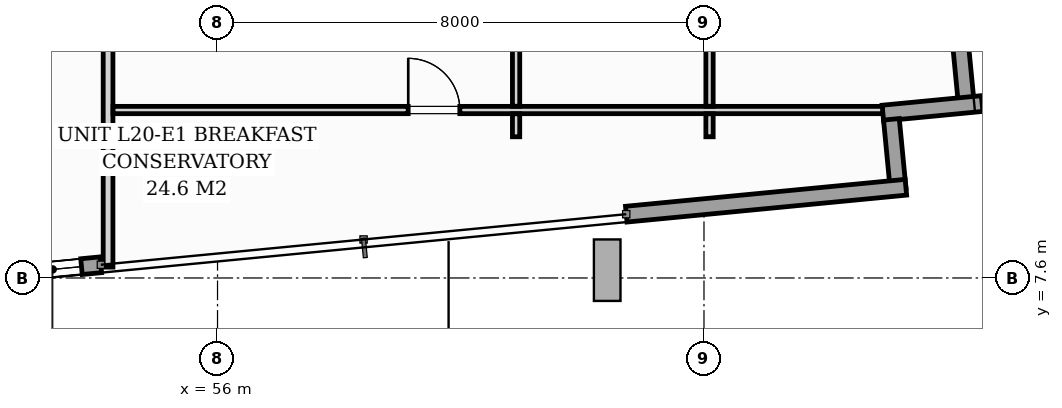
"""IFC4 building model, lengths in metres.
Left out: names, types, materials, properties, quantities, classifications, styles, units other than length and angle.
Written with IfcOpenShell. Run it as: python <this file> out.ifc"""

import sys

from ifc_helpers import new_model, si_unit, direction, frame, frame_2d, origin, origin_2d, place, context, subcontext, project, spatial, rectangle, i_section, extrude, source, transform, mapped, element, fill, save


model = new_model("IFC4")
c1 = context("Model", 3, precision=1e-05, world=origin(), true_north=direction((0.0, 1.0)))
c2 = subcontext(c1, "Body", "Model", "MODEL_VIEW")
j1 = project(units=[si_unit("LENGTHUNIT", "METRE"), si_unit("PLANEANGLEUNIT", "RADIAN")], contexts=[c1])
p1 = place(None, origin())
s1 = spatial("IfcSite", under=j1, at=p1, CompositionType="ELEMENT")
p2 = place(p1, origin())
s2 = spatial("IfcBuilding", under=s1, at=p2, CompositionType="ELEMENT")
p3 = place(p2, frame((0.0, 0.0, 72.6)))
s3 = spatial("IfcBuildingStorey", under=s2, at=p3, CompositionType="ELEMENT", Elevation=72.6)
m1 = source(origin(), c2, "Body", "SweptSolid", [
    extrude(i_section(OverallWidth=0.438, OverallDepth=1.011, WebThickness=0.041, FlangeThickness=0.074, FilletRadius=0.024, at=origin_2d()), origin(), (0.0, 0.0, 1.0), 6.388),
])
p4 = place(p3, frame((48.945, 6.415, 0.169), z_axis=(0.624362881187, 0.356074491279, 0.695256750601), x_axis=(-0.60394515579, -0.344430251362, 0.718761469991)))
e1 = element("IfcColumn", 1, at=p4, inside=s3, PredefinedType="COLUMN", context=c2, shape_type="MappedRepresentation", body=[
    mapped(m1, transform((0.0, 0.0, 0.0), scale=1.0)),
])
m2 = source(origin(), c2, "Body", "SweptSolid", [
    extrude(i_section(OverallWidth=0.438, OverallDepth=1.011, WebThickness=0.041, FlangeThickness=0.074, FilletRadius=0.024, at=origin_2d()), origin(), (0.0, 0.0, 1.0), 6.973),
])
p5 = place(p3, frame((61.351, 7.073, 0.181), z_axis=(0.65764639219, 0.407667940303, 0.633488810705), x_axis=(-0.538430545128, -0.333767316198, 0.773751850861)))
e2 = element("IfcColumn", 2, at=p5, inside=s3, PredefinedType="COLUMN", context=c2, shape_type="MappedRepresentation", body=[
    mapped(m2, transform((0.0, 0.0, 0.0), scale=1.0)),
])
p6 = place(p3, frame((68.183, 11.817, 0.0), z_axis=(0.0, 0.0, 1.0), x_axis=(0.095915846097, -0.995389446633, 0.0)))
e3 = element("IfcWall", 3, at=p6, inside=s3, PredefinedType="STANDARD", context=c2, shape_type="SweptSolid", body=[
    extrude(rectangle(XDim=1.395, YDim=0.26, at=frame_2d((0.697, 0.0))), origin(), (0.0, 0.0, 1.0), 4.78),
])
p7 = place(p3, frame((68.574, 10.469, 0.0), z_axis=(0.0, 0.0, 1.0), x_axis=(-0.995394563142, -0.095862733462, 0.0)))
e4 = element("IfcWall", 4, at=p7, inside=s3, PredefinedType="STANDARD", context=c2, shape_type="SweptSolid", body=[
    extrude(rectangle(XDim=1.64, YDim=0.26, at=frame_2d((0.82, 0.0))), origin(), (0.0, 0.0, 1.0), 4.78),
])
p8 = place(p3, frame((67.082, 10.209, 0.0), z_axis=(0.0, 0.0, 1.0), x_axis=(0.09576095695, -0.995404359607, 0.0)))
e5 = element("IfcWall", 5, at=p8, inside=s3, PredefinedType="STANDARD", context=c2, shape_type="SweptSolid", body=[
    extrude(rectangle(XDim=1.15, YDim=0.26, at=frame_2d((0.575, 0.0))), origin(), (0.0, 0.0, 1.0), 4.78),
])
p9 = place(p3, frame((67.32, 9.092, 0.0), z_axis=(0.0, 0.0, 1.0), x_axis=(-0.99539468832, -0.09586143367, 0.0)))
e6 = element("IfcWall", 6, at=p9, inside=s3, PredefinedType="STANDARD", context=c2, shape_type="SweptSolid", body=[
    extrude(rectangle(XDim=4.62, YDim=0.26, at=frame_2d((2.31, 0.0))), origin(), (0.0, 0.0, 1.0), 4.78),
])
p10 = place(p3, frame((54.082, 7.817, 0.0), z_axis=(0.0, 0.0, 1.0), x_axis=(-0.995397041205, -0.095836998914, 0.0)))
e7 = element("IfcWall", 7, at=p10, inside=s3, PredefinedType="STANDARD", context=c2, shape_type="SweptSolid", body=[
    extrude(rectangle(XDim=6.31, YDim=0.26, at=frame_2d((3.155, 0.0))), origin(), (0.0, 0.0, 1.0), 4.78),
])
p11 = place(p10, frame((0.32, 0.0, 0.75)))
e8 = element("IfcOpeningElement", 8, at=p11, cuts=e7, PredefinedType="OPENING", context=c2, shape_type="SweptSolid", body=[
    extrude(rectangle(XDim=0.95, YDim=1.5, at=frame_2d((0.475, 0.75))), frame((0.0, 0.14, 0.0), z_axis=(0.0, -1.0, 0.0), x_axis=(1.0, 0.0, 0.0)), (0.0, 0.0, 1.0), 0.28),
])
p12 = place(p3, frame((54.2, 7.778, 0.0), z_axis=(0.0, 0.0, 1.0), x_axis=(0.0, 1.0, 0.0)))
e9 = element("IfcWall", 9, at=p12, inside=s3, PredefinedType="PARTITIONING", context=c2, shape_type="SweptSolid", body=[
    extrude(rectangle(XDim=4.49, YDim=0.16, at=frame_2d((2.245, 0.0))), origin(), (0.0, 0.0, 1.0), 4.78),
])
p13 = place(p3, frame((54.282, 10.362, 0.0), z_axis=(0.0, 0.0, 1.0), x_axis=(1.0, 0.0, 0.0)))
e10 = element("IfcWall", 10, at=p13, inside=s3, PredefinedType="PARTITIONING", context=c2, shape_type="SweptSolid", body=[
    extrude(rectangle(XDim=12.655, YDim=0.12, at=frame_2d((6.327, 0.0))), origin(), (0.0, 0.0, 1.0), 4.78),
])
p14 = place(p13, frame((4.853, 0.0, 0.0)))
e11 = element("IfcOpeningElement", 11, at=p14, cuts=e10, PredefinedType="OPENING", context=c2, shape_type="SweptSolid", body=[
    extrude(rectangle(XDim=0.85, YDim=2.05, at=frame_2d((0.425, 1.025))), frame((0.0, 0.07, 0.0), z_axis=(0.0, -1.0, 0.0), x_axis=(1.0, 0.0, 0.0)), (0.0, 0.0, 1.0), 0.14),
])
p15 = place(p3, frame((64.091, 9.922, 0.0), z_axis=(0.0, 0.0, 1.0), x_axis=(0.0, 1.0, 0.0)))
e12 = element("IfcWall", 12, at=p15, inside=s3, PredefinedType="PARTITIONING", context=c2, shape_type="SweptSolid", body=[
    extrude(rectangle(XDim=0.378, YDim=0.12, at=frame_2d((0.189, 0.0))), origin(), (0.0, 0.0, 1.0), 4.78),
])
p16 = place(p3, frame((64.091, 10.424, 0.0), z_axis=(0.0, 0.0, 1.0), x_axis=(0.0, 1.0, 0.0)))
e13 = element("IfcWall", 13, at=p16, inside=s3, PredefinedType="PARTITIONING", context=c2, shape_type="SweptSolid", body=[
    extrude(rectangle(XDim=9.332, YDim=0.12, at=frame_2d((4.666, 0.0))), origin(), (0.0, 0.0, 1.0), 4.78),
])
p17 = place(p16, frame((4.241, 0.0, 0.0)))
e14 = element("IfcOpeningElement", 14, at=p17, cuts=e13, PredefinedType="OPENING", context=c2, shape_type="SweptSolid", body=[
    extrude(rectangle(XDim=0.85, YDim=2.05, at=frame_2d((0.425, 1.025))), frame((0.0, 0.07, 0.0), z_axis=(0.0, -1.0, 0.0), x_axis=(1.0, 0.0, 0.0)), (0.0, 0.0, 1.0), 0.14),
])
p18 = place(p3, frame((60.91, 9.922, 0.0), z_axis=(0.0, 0.0, 1.0), x_axis=(0.0, 1.0, 0.0)))
e15 = element("IfcWall", 15, at=p18, inside=s3, PredefinedType="PARTITIONING", context=c2, shape_type="SweptSolid", body=[
    extrude(rectangle(XDim=0.378, YDim=0.12, at=frame_2d((0.189, 0.0))), origin(), (0.0, 0.0, 1.0), 4.78),
])
p19 = place(p3, frame((60.91, 10.424, 0.0), z_axis=(0.0, 0.0, 1.0), x_axis=(0.0, 1.0, 0.0)))
e16 = element("IfcWall", 16, at=p19, inside=s3, PredefinedType="PARTITIONING", context=c2, shape_type="SweptSolid", body=[
    extrude(rectangle(XDim=9.332, YDim=0.12, at=frame_2d((4.666, 0.0))), origin(), (0.0, 0.0, 1.0), 4.78),
])
p20 = place(p19, frame((3.3, 0.0, 0.0)))
e17 = element("IfcOpeningElement", 17, at=p20, cuts=e16, PredefinedType="OPENING", context=c2, shape_type="SweptSolid", body=[
    extrude(rectangle(XDim=0.85, YDim=2.05, at=frame_2d((0.425, 1.025))), frame((0.0, 0.07, 0.0), z_axis=(0.0, -1.0, 0.0), x_axis=(1.0, 0.0, 0.0)), (0.0, 0.0, 1.0), 0.14),
])
m3 = source(origin(), c2, "Body", "SweptSolid", [
    extrude(rectangle(XDim=0.95, YDim=1.5, at=frame_2d((0.475, 0.75))), frame((0.0, 0.03, 0.0), z_axis=(0.0, -1.0, 0.0), x_axis=(1.0, 0.0, 0.0)), (0.0, 0.0, 1.0), 0.06),
])
p21 = place(p11, origin())
e18 = element("IfcWindow", 18, at=p21, inside=s3, PartitioningType="SINGLE_PANEL", PredefinedType="WINDOW", context=c2, shape_type="MappedRepresentation", body=[
    mapped(m3, transform((0.0, 0.0, 0.0), scale=1.0)),
])
fill(e8, e18)
m4 = source(origin(), c2, "Body", "SweptSolid", [
    extrude(rectangle(XDim=0.85, YDim=2.05, at=frame_2d((0.425, 1.025))), frame((0.0, 0.025, 0.0), z_axis=(0.0, -1.0, 0.0), x_axis=(1.0, 0.0, 0.0)), (0.0, 0.0, 1.0), 0.05),
])
p22 = place(p14, origin())
e19 = element("IfcDoor", 19, at=p22, inside=s3, OperationType="SINGLE_SWING_LEFT", PredefinedType="DOOR", context=c2, shape_type="MappedRepresentation", body=[
    mapped(m4, transform((0.0, 0.0, 0.0), scale=1.0)),
])
fill(e11, e19)
save(model, sys.argv[1])
